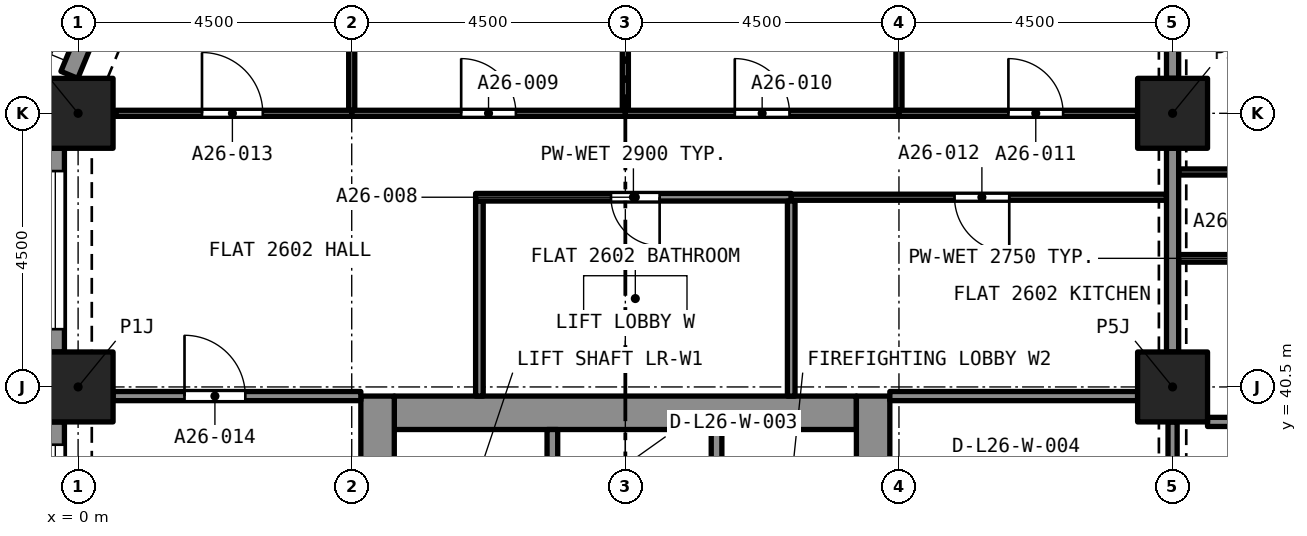
"""IFC4 building model, lengths in metres.
Left out: names, types, materials, properties, quantities, classifications, styles, units other than length and angle.
Written with IfcOpenShell. Run it as: python <this file> out.ifc"""

import sys

from ifc_helpers import new_model, si_unit, direction, frame, frame_2d, origin, origin_2d, place, context, subcontext, project, spatial, rectangle, extrude, element, fill, save


model = new_model("IFC4")
c1 = context("Model", 3, precision=1e-05, world=origin(), true_north=direction((0.0, 1.0)))
c2 = subcontext(c1, "Body", "Model", "MODEL_VIEW")
j1 = project(units=[si_unit("LENGTHUNIT", "METRE"), si_unit("PLANEANGLEUNIT", "RADIAN")], contexts=[c1])
p1 = place(None, origin())
s1 = spatial("IfcSite", under=j1, at=p1, CompositionType="ELEMENT")
p2 = place(p1, origin())
s2 = spatial("IfcBuilding", under=s1, at=p2, CompositionType="ELEMENT")
p3 = place(p2, frame((0.0, 0.0, 96.0)))
s3 = spatial("IfcBuildingStorey", under=s2, at=p3, CompositionType="ELEMENT", Elevation=96.0)
for number, where, z_axis, x_axis in (
    (1, (0.0, 40.5, 0.0), (0.0, 0.0, 1.0), (1.0, 0.0, 0.0)),
    (2, (18.0, 40.5, 0.0), (0.0, 0.0, 1.0), (1.0, 0.0, 0.0)),
    (3, (0.0, 45.0, 0.0), (0.0, 0.0, 1.0), (1.0, 0.0, 0.0)),
    (4, (18.0, 45.0, 0.0), (0.0, 0.0, 1.0), (1.0, 0.0, 0.0)),
):
    element("IfcColumn", number, at=place(p3, frame(where, z_axis=z_axis, x_axis=x_axis)), inside=s3, PredefinedType="COLUMN", context=c2, shape_type="SweptSolid", body=[
        extrude(rectangle(XDim=1.15, YDim=1.15, at=origin_2d()), origin(), (0.0, 0.0, 1.0), 3.2),
    ])
p4 = place(p3, frame((5.2, 40.075, 0.0), z_axis=(0.0, 0.0, 1.0), x_axis=(1.0, 0.0, 0.0)))
e5 = element("IfcWall", 5, at=p4, inside=s3, PredefinedType="SOLIDWALL", context=c2, shape_type="SweptSolid", body=[
    extrude(rectangle(XDim=7.6, YDim=0.55, at=frame_2d((3.8, 0.0))), origin(), (0.0, 0.0, 1.0), 3.2),
])
p5 = place(p3, frame((4.925, 27.15, 0.0), z_axis=(0.0, 0.0, 1.0), x_axis=(0.0, 1.0, 0.0)))
e6 = element("IfcWall", 6, at=p5, inside=s3, PredefinedType="SOLIDWALL", context=c2, shape_type="SweptSolid", body=[
    extrude(rectangle(XDim=13.2, YDim=0.55, at=frame_2d((6.6, 0.0))), origin(), (0.0, 0.0, 1.0), 3.2),
])
p6 = place(p5, frame((8.8, 0.0, 0.0)))
e7 = element("IfcOpeningElement", 7, at=p6, cuts=e6, PredefinedType="OPENING", context=c2, shape_type="SweptSolid", body=[
    extrude(rectangle(XDim=1.2, YDim=2.1, at=frame_2d((0.6, 1.05))), frame((0.0, 0.285, 0.0), z_axis=(0.0, -1.0, 0.0), x_axis=(1.0, 0.0, 0.0)), (0.0, 0.0, 1.0), 0.57),
])
p7 = place(p3, frame((13.075, 27.15, 0.0), z_axis=(0.0, 0.0, 1.0), x_axis=(0.0, 1.0, 0.0)))
e8 = element("IfcWall", 8, at=p7, inside=s3, PredefinedType="SOLIDWALL", context=c2, shape_type="SweptSolid", body=[
    extrude(rectangle(XDim=13.2, YDim=0.55, at=frame_2d((6.6, 0.0))), origin(), (0.0, 0.0, 1.0), 3.2),
])
p8 = place(p7, frame((10.95, 0.0, 0.0)))
e9 = element("IfcOpeningElement", 9, at=p8, cuts=e8, PredefinedType="OPENING", context=c2, shape_type="SweptSolid", body=[
    extrude(rectangle(XDim=1.1, YDim=2.1, at=frame_2d((0.55, 1.05))), frame((0.0, 0.285, 0.0), z_axis=(0.0, -1.0, 0.0), x_axis=(1.0, 0.0, 0.0)), (0.0, 0.0, 1.0), 0.57),
])
p9 = place(p7, frame((8.8, 0.0, 0.0)))
e10 = element("IfcOpeningElement", 10, at=p9, cuts=e8, PredefinedType="OPENING", context=c2, shape_type="SweptSolid", body=[
    extrude(rectangle(XDim=1.2, YDim=2.1, at=frame_2d((0.6, 1.05))), frame((0.0, 0.285, 0.0), z_axis=(0.0, -1.0, 0.0), x_axis=(1.0, 0.0, 0.0)), (0.0, 0.0, 1.0), 0.57),
])
p10 = place(p3, frame((-0.144, 45.632, 0.0), z_axis=(0.0, 0.0, 1.0), x_axis=(0.382723818695, 0.923862802911, 0.0)))
e11 = element("IfcWall", 11, at=p10, inside=s3, PredefinedType="SOLIDWALL", context=c2, shape_type="SweptSolid", body=[
    extrude(rectangle(XDim=2.164, YDim=0.3, at=frame_2d((1.082, 0.0))), origin(), (0.0, 0.0, 1.0), 3.2),
])
p11 = place(p10, frame((0.493, 0.0, 0.45)))
e12 = element("IfcOpeningElement", 12, at=p11, cuts=e11, PredefinedType="OPENING", context=c2, shape_type="SweptSolid", body=[
    extrude(rectangle(XDim=1.4, YDim=1.95, at=frame_2d((0.7, 0.975))), frame((0.0, 0.16, 0.0), z_axis=(0.0, -1.0, 0.0), x_axis=(1.0, 0.0, 0.0)), (0.0, 0.0, 1.0), 0.32),
])
p12 = place(p3, frame((-0.375, 41.075, 0.0), z_axis=(0.0, 0.0, 1.0), x_axis=(0.0, 1.0, 0.0)))
e13 = element("IfcWall", 13, at=p12, inside=s3, PredefinedType="SOLIDWALL", context=c2, shape_type="SweptSolid", body=[
    extrude(rectangle(XDim=3.35, YDim=0.3, at=frame_2d((1.675, 0.0))), origin(), (0.0, 0.0, 1.0), 3.2),
])
p13 = place(p12, frame((0.375, 0.0, 0.45)))
e14 = element("IfcOpeningElement", 14, at=p13, cuts=e13, PredefinedType="OPENING", context=c2, shape_type="SweptSolid", body=[
    extrude(rectangle(XDim=2.6, YDim=1.95, at=frame_2d((1.3, 0.975))), frame((0.0, 0.16, 0.0), z_axis=(0.0, -1.0, 0.0), x_axis=(1.0, 0.0, 0.0)), (0.0, 0.0, 1.0), 0.32),
])
p14 = place(p3, frame((-0.375, 36.575, 0.0), z_axis=(0.0, 0.0, 1.0), x_axis=(0.0, 1.0, 0.0)))
e15 = element("IfcWall", 15, at=p14, inside=s3, PredefinedType="SOLIDWALL", context=c2, shape_type="SweptSolid", body=[
    extrude(rectangle(XDim=3.35, YDim=0.3, at=frame_2d((1.675, 0.0))), origin(), (0.0, 0.0, 1.0), 3.2),
])
p15 = place(p14, frame((0.375, 0.0, 0.45)))
e16 = element("IfcOpeningElement", 16, at=p15, cuts=e15, PredefinedType="OPENING", context=c2, shape_type="SweptSolid", body=[
    extrude(rectangle(XDim=2.6, YDim=1.95, at=frame_2d((1.3, 0.975))), frame((0.0, 0.16, 0.0), z_axis=(0.0, -1.0, 0.0), x_axis=(1.0, 0.0, 0.0)), (0.0, 0.0, 1.0), 0.32),
])
p16 = place(p3, frame((6.6, 40.35, 0.0), z_axis=(0.0, 0.0, 1.0), x_axis=(0.0, 1.0, 0.0)))
e17 = element("IfcWall", 17, at=p16, inside=s3, PredefinedType="PARTITIONING", context=c2, shape_type="SweptSolid", body=[
    extrude(rectangle(XDim=3.208, YDim=0.125, at=frame_2d((1.604, 0.0))), origin(), (0.0, 0.0, 1.0), 2.9),
])
p17 = place(p3, frame((11.728, 43.62, 0.0), z_axis=(0.0, 0.0, 1.0), x_axis=(-1.0, 0.0, 0.0)))
e18 = element("IfcWall", 18, at=p17, inside=s3, PredefinedType="PARTITIONING", context=c2, shape_type="SweptSolid", body=[
    extrude(rectangle(XDim=5.19, YDim=0.125, at=frame_2d((2.595, 0.0))), origin(), (0.0, 0.0, 1.0), 2.9),
])
p18 = place(p17, frame((2.164, 0.0, 0.0)))
e19 = element("IfcOpeningElement", 19, at=p18, cuts=e18, PredefinedType="OPENING", context=c2, shape_type="SweptSolid", body=[
    extrude(rectangle(XDim=0.8, YDim=2.1, at=frame_2d((0.4, 1.05))), frame((0.0, 0.073, 0.0), z_axis=(0.0, -1.0, 0.0), x_axis=(1.0, 0.0, 0.0)), (0.0, 0.0, 1.0), 0.145),
])
p19 = place(p3, frame((11.728, 40.35, 0.0), z_axis=(0.0, 0.0, 1.0), x_axis=(0.0, 1.0, 0.0)))
e20 = element("IfcWall", 20, at=p19, inside=s3, PredefinedType="PARTITIONING", context=c2, shape_type="SweptSolid", body=[
    extrude(rectangle(XDim=3.208, YDim=0.125, at=frame_2d((1.604, 0.0))), origin(), (0.0, 0.0, 1.0), 2.9),
])
p20 = place(p3, frame((9.0, 45.05, 0.0), z_axis=(0.0, 0.0, 1.0), x_axis=(0.0, 1.0, 0.0)))
e21 = element("IfcWall", 21, at=p20, inside=s3, PredefinedType="PARTITIONING", context=c2, shape_type="SweptSolid", body=[
    extrude(rectangle(XDim=3.875, YDim=0.1, at=frame_2d((1.938, 0.0))), origin(), (0.0, 0.0, 1.0), 2.9),
])
p21 = place(p3, frame((4.5, 45.0, 0.0), z_axis=(0.0, 0.0, 1.0), x_axis=(1.0, 0.0, 0.0)))
e22 = element("IfcWall", 22, at=p21, inside=s3, PredefinedType="PARTITIONING", context=c2, shape_type="SweptSolid", body=[
    extrude(rectangle(XDim=4.5, YDim=0.1, at=frame_2d((2.25, 0.0))), origin(), (0.0, 0.0, 1.0), 2.9),
])
p22 = place(p21, frame((1.8, 0.0, 0.0)))
e23 = element("IfcOpeningElement", 23, at=p22, cuts=e22, PredefinedType="OPENING", context=c2, shape_type="SweptSolid", body=[
    extrude(rectangle(XDim=0.9, YDim=2.1, at=frame_2d((0.45, 1.05))), frame((0.0, 0.06, 0.0), z_axis=(0.0, -1.0, 0.0), x_axis=(1.0, 0.0, 0.0)), (0.0, 0.0, 1.0), 0.12),
])
p23 = place(p3, frame((4.5, 45.05, 0.0), z_axis=(0.0, 0.0, 1.0), x_axis=(0.0, 1.0, 0.0)))
e24 = element("IfcWall", 24, at=p23, inside=s3, PredefinedType="PARTITIONING", context=c2, shape_type="SweptSolid", body=[
    extrude(rectangle(XDim=3.828, YDim=0.1, at=frame_2d((1.914, 0.0))), origin(), (0.0, 0.0, 1.0), 2.9),
])
p24 = place(p3, frame((13.5, 45.05, 0.0), z_axis=(0.0, 0.0, 1.0), x_axis=(0.0, 1.0, 0.0)))
e25 = element("IfcWall", 25, at=p24, inside=s3, PredefinedType="PARTITIONING", context=c2, shape_type="SweptSolid", body=[
    extrude(rectangle(XDim=3.875, YDim=0.1, at=frame_2d((1.938, 0.0))), origin(), (0.0, 0.0, 1.0), 2.9),
])
p25 = place(p3, frame((9.0, 45.0, 0.0), z_axis=(0.0, 0.0, 1.0), x_axis=(1.0, 0.0, 0.0)))
e26 = element("IfcWall", 26, at=p25, inside=s3, PredefinedType="PARTITIONING", context=c2, shape_type="SweptSolid", body=[
    extrude(rectangle(XDim=4.5, YDim=0.1, at=frame_2d((2.25, 0.0))), origin(), (0.0, 0.0, 1.0), 2.9),
])
p26 = place(p25, frame((1.8, 0.0, 0.0)))
e27 = element("IfcOpeningElement", 27, at=p26, cuts=e26, PredefinedType="OPENING", context=c2, shape_type="SweptSolid", body=[
    extrude(rectangle(XDim=0.9, YDim=2.1, at=frame_2d((0.45, 1.05))), frame((0.0, 0.06, 0.0), z_axis=(0.0, -1.0, 0.0), x_axis=(1.0, 0.0, 0.0)), (0.0, 0.0, 1.0), 0.12),
])
p27 = place(p3, frame((13.5, 45.0, 0.0), z_axis=(0.0, 0.0, 1.0), x_axis=(1.0, 0.0, 0.0)))
e28 = element("IfcWall", 28, at=p27, inside=s3, PredefinedType="PARTITIONING", context=c2, shape_type="SweptSolid", body=[
    extrude(rectangle(XDim=3.925, YDim=0.1, at=frame_2d((1.962, 0.0))), origin(), (0.0, 0.0, 1.0), 2.9),
])
p28 = place(p27, frame((1.8, 0.0, 0.0)))
e29 = element("IfcOpeningElement", 29, at=p28, cuts=e28, PredefinedType="OPENING", context=c2, shape_type="SweptSolid", body=[
    extrude(rectangle(XDim=0.9, YDim=2.1, at=frame_2d((0.45, 1.05))), frame((0.0, 0.06, 0.0), z_axis=(0.0, -1.0, 0.0), x_axis=(1.0, 0.0, 0.0)), (0.0, 0.0, 1.0), 0.12),
])
p29 = place(p3, frame((18.0, 45.575, 0.0), z_axis=(0.0, 0.0, 1.0), x_axis=(0.0, 1.0, 0.0)))
e30 = element("IfcWall", 30, at=p29, inside=s3, PredefinedType="PARTITIONING", context=c2, shape_type="SweptSolid", body=[
    extrude(rectangle(XDim=3.35, YDim=0.2, at=frame_2d((1.675, 0.0))), origin(), (0.0, 0.0, 1.0), 2.38),
])
p30 = place(p3, frame((17.9, 43.62, 0.0), z_axis=(0.0, 0.0, 1.0), x_axis=(-1.0, 0.0, 0.0)))
e31 = element("IfcWall", 31, at=p30, inside=s3, PredefinedType="PARTITIONING", context=c2, shape_type="SweptSolid", body=[
    extrude(rectangle(XDim=6.172, YDim=0.1, at=frame_2d((3.086, 0.0))), origin(), (0.0, 0.0, 1.0), 2.9),
])
p31 = place(p30, frame((2.586, 0.0, 0.0)))
e32 = element("IfcOpeningElement", 32, at=p31, cuts=e31, PredefinedType="OPENING", context=c2, shape_type="SweptSolid", body=[
    extrude(rectangle(XDim=0.9, YDim=2.1, at=frame_2d((0.45, 1.05))), frame((0.0, 0.06, 0.0), z_axis=(0.0, -1.0, 0.0), x_axis=(1.0, 0.0, 0.0)), (0.0, 0.0, 1.0), 0.12),
])
p32 = place(p3, frame((0.622, 45.0, 0.0), z_axis=(0.0, 0.0, 1.0), x_axis=(1.0, 0.0, 0.0)))
e33 = element("IfcWall", 33, at=p32, inside=s3, PredefinedType="PARTITIONING", context=c2, shape_type="SweptSolid", body=[
    extrude(rectangle(XDim=3.878, YDim=0.1, at=frame_2d((1.939, 0.0))), origin(), (0.0, 0.0, 1.0), 2.9),
])
p33 = place(p32, frame((1.415, 0.0, 0.0)))
e34 = element("IfcOpeningElement", 34, at=p33, cuts=e33, PredefinedType="OPENING", context=c2, shape_type="SweptSolid", body=[
    extrude(rectangle(XDim=1.0, YDim=2.1, at=frame_2d((0.5, 1.05))), frame((0.0, 0.06, 0.0), z_axis=(0.0, -1.0, 0.0), x_axis=(1.0, 0.0, 0.0)), (0.0, 0.0, 1.0), 0.12),
])
p34 = place(p3, frame((0.575, 40.35, 0.0), z_axis=(0.0, 0.0, 1.0), x_axis=(1.0, 0.0, 0.0)))
e35 = element("IfcWall", 35, at=p34, inside=s3, PredefinedType="PARTITIONING", context=c2, shape_type="SweptSolid", body=[
    extrude(rectangle(XDim=4.075, YDim=0.15, at=frame_2d((2.038, 0.0))), origin(), (0.0, 0.0, 1.0), 2.9),
])
p35 = place(p34, frame((1.175, 0.0, 0.0)))
e36 = element("IfcOpeningElement", 36, at=p35, cuts=e35, PredefinedType="OPENING", context=c2, shape_type="SweptSolid", body=[
    extrude(rectangle(XDim=1.0, YDim=2.1, at=frame_2d((0.5, 1.05))), frame((0.0, 0.085, 0.0), z_axis=(0.0, -1.0, 0.0), x_axis=(1.0, 0.0, 0.0)), (0.0, 0.0, 1.0), 0.17),
])
p36 = place(p3, frame((18.0, 41.075, 0.0), z_axis=(0.0, 0.0, 1.0), x_axis=(0.0, 1.0, 0.0)))
e37 = element("IfcWall", 37, at=p36, inside=s3, PredefinedType="PARTITIONING", context=c2, shape_type="SweptSolid", body=[
    extrude(rectangle(XDim=3.35, YDim=0.2, at=frame_2d((1.675, 0.0))), origin(), (0.0, 0.0, 1.0), 2.38),
])
p37 = place(p3, frame((13.35, 40.35, 0.0), z_axis=(0.0, 0.0, 1.0), x_axis=(1.0, 0.0, 0.0)))
e38 = element("IfcWall", 38, at=p37, inside=s3, PredefinedType="PARTITIONING", context=c2, shape_type="SweptSolid", body=[
    extrude(rectangle(XDim=4.075, YDim=0.15, at=frame_2d((2.038, 0.0))), origin(), (0.0, 0.0, 1.0), 2.9),
])
p38 = place(p3, frame((20.762, 42.615, 0.0), z_axis=(0.0, 0.0, 1.0), x_axis=(-1.0, 0.0, 0.0)))
e39 = element("IfcWall", 39, at=p38, inside=s3, PredefinedType="PARTITIONING", context=c2, shape_type="SweptSolid", body=[
    extrude(rectangle(XDim=2.662, YDim=0.125, at=frame_2d((1.331, 0.0))), origin(), (0.0, 0.0, 1.0), 2.75),
])
p39 = place(p38, frame((1.012, 0.0, 0.0)))
e40 = element("IfcOpeningElement", 40, at=p39, cuts=e39, PredefinedType="OPENING", context=c2, shape_type="SweptSolid", body=[
    extrude(rectangle(XDim=0.8, YDim=2.1, at=frame_2d((0.4, 1.05))), frame((0.0, 0.073, 0.0), z_axis=(0.0, -1.0, 0.0), x_axis=(1.0, 0.0, 0.0)), (0.0, 0.0, 1.0), 0.145),
])
p40 = place(p3, frame((18.575, 39.925, 0.0), z_axis=(0.0, 0.0, 1.0), x_axis=(1.0, 0.0, 0.0)))
e41 = element("IfcWall", 41, at=p40, inside=s3, PredefinedType="PARTITIONING", context=c2, shape_type="SweptSolid", body=[
    extrude(rectangle(XDim=2.125, YDim=0.15, at=frame_2d((1.062, 0.0))), origin(), (0.0, 0.0, 1.0), 2.75),
])
p41 = place(p3, frame((18.1, 44.035, 0.0), z_axis=(0.0, 0.0, 1.0), x_axis=(1.0, 0.0, 0.0)))
e42 = element("IfcWall", 42, at=p41, inside=s3, PredefinedType="PARTITIONING", context=c2, shape_type="SweptSolid", body=[
    extrude(rectangle(XDim=4.4, YDim=0.1, at=frame_2d((2.2, 0.0))), origin(), (0.0, 0.0, 1.0), 2.75),
])
p42 = place(p41, frame((1.65, 0.0, 0.0)))
e43 = element("IfcOpeningElement", 43, at=p42, cuts=e42, PredefinedType="OPENING", context=c2, shape_type="SweptSolid", body=[
    extrude(rectangle(XDim=1.0, YDim=2.1, at=frame_2d((0.5, 1.05))), frame((0.0, 0.06, 0.0), z_axis=(0.0, -1.0, 0.0), x_axis=(1.0, 0.0, 0.0)), (0.0, 0.0, 1.0), 0.12),
])
p43 = place(p3, frame((18.0, 39.925, 0.0), z_axis=(0.0, 0.0, 1.0), x_axis=(0.0, -1.0, 0.0)))
e44 = element("IfcWall", 44, at=p43, inside=s3, PredefinedType="PARTITIONING", context=c2, shape_type="SweptSolid", body=[
    extrude(rectangle(XDim=3.35, YDim=0.15, at=frame_2d((1.675, 0.0))), origin(), (0.0, 0.0, 1.0), 2.38),
])
p44 = place(p43, frame((1.075, 0.0, 0.0)))
e45 = element("IfcOpeningElement", 45, at=p44, cuts=e44, PredefinedType="OPENING", context=c2, shape_type="SweptSolid", body=[
    extrude(rectangle(XDim=1.2, YDim=2.1, at=frame_2d((0.6, 1.05))), frame((0.0, 0.085, 0.0), z_axis=(0.0, -1.0, 0.0), x_axis=(1.0, 0.0, 0.0)), (0.0, 0.0, 1.0), 0.17),
])
p45 = place(p3, frame((7.8, 37.5, 0.0), z_axis=(0.0, 0.0, 1.0), x_axis=(0.0, 1.0, 0.0)))
e46 = element("IfcWall", 46, at=p45, inside=s3, PredefinedType="SOLIDWALL", context=c2, shape_type="SweptSolid", body=[
    extrude(rectangle(XDim=2.3, YDim=0.175, at=frame_2d((1.15, 0.0))), origin(), (0.0, 0.0, 1.0), 2.9),
])
p46 = place(p3, frame((10.5, 37.5, 0.0), z_axis=(0.0, 0.0, 1.0), x_axis=(0.0, 1.0, 0.0)))
e47 = element("IfcWall", 47, at=p46, inside=s3, PredefinedType="SOLIDWALL", context=c2, shape_type="SweptSolid", body=[
    extrude(rectangle(XDim=2.3, YDim=0.175, at=frame_2d((1.15, 0.0))), origin(), (0.0, 0.0, 1.0), 2.9),
])
p47 = place(p46, frame((0.65, 0.0, 0.0)))
e48 = element("IfcOpeningElement", 48, at=p47, cuts=e47, PredefinedType="OPENING", context=c2, shape_type="SweptSolid", body=[
    extrude(rectangle(XDim=1.0, YDim=2.1, at=frame_2d((0.5, 1.05))), frame((0.0, 0.097, 0.0), z_axis=(0.0, -1.0, 0.0), x_axis=(1.0, 0.0, 0.0)), (0.0, 0.0, 1.0), 0.195),
])
p48 = place(p13, origin())
e49 = element("IfcWindow", 49, at=p48, inside=s3, PartitioningType="SINGLE_PANEL", PredefinedType="WINDOW", context=c2, shape_type="SweptSolid", body=[
    extrude(rectangle(XDim=2.6, YDim=1.95, at=frame_2d((1.3, 0.975))), frame((0.0, 0.03, 0.0), z_axis=(0.0, -1.0, 0.0), x_axis=(1.0, 0.0, 0.0)), (0.0, 0.0, 1.0), 0.06),
])
fill(e14, e49)
p49 = place(p15, origin())
e50 = element("IfcWindow", 50, at=p49, inside=s3, PartitioningType="SINGLE_PANEL", PredefinedType="WINDOW", context=c2, shape_type="SweptSolid", body=[
    extrude(rectangle(XDim=2.6, YDim=1.95, at=frame_2d((1.3, 0.975))), frame((0.0, 0.03, 0.0), z_axis=(0.0, -1.0, 0.0), x_axis=(1.0, 0.0, 0.0)), (0.0, 0.0, 1.0), 0.06),
])
fill(e16, e50)
p50 = place(p18, origin())
e51 = element("IfcDoor", 51, at=p50, inside=s3, OperationType="SINGLE_SWING_LEFT", PredefinedType="DOOR", context=c2, shape_type="SweptSolid", body=[
    extrude(rectangle(XDim=0.8, YDim=2.1, at=frame_2d((0.4, 1.05))), frame((0.0, 0.025, 0.0), z_axis=(0.0, -1.0, 0.0), x_axis=(1.0, 0.0, 0.0)), (0.0, 0.0, 1.0), 0.05),
])
fill(e19, e51)
p51 = place(p22, origin())
e52 = element("IfcDoor", 52, at=p51, inside=s3, OperationType="SINGLE_SWING_RIGHT", PredefinedType="DOOR", context=c2, shape_type="SweptSolid", body=[
    extrude(rectangle(XDim=0.9, YDim=2.1, at=frame_2d((0.45, 1.05))), frame((0.0, 0.025, 0.0), z_axis=(0.0, -1.0, 0.0), x_axis=(1.0, 0.0, 0.0)), (0.0, 0.0, 1.0), 0.05),
])
fill(e23, e52)
p52 = place(p26, origin())
e53 = element("IfcDoor", 53, at=p52, inside=s3, OperationType="SINGLE_SWING_LEFT", PredefinedType="DOOR", context=c2, shape_type="SweptSolid", body=[
    extrude(rectangle(XDim=0.9, YDim=2.1, at=frame_2d((0.45, 1.05))), frame((0.0, 0.025, 0.0), z_axis=(0.0, -1.0, 0.0), x_axis=(1.0, 0.0, 0.0)), (0.0, 0.0, 1.0), 0.05),
])
fill(e27, e53)
p53 = place(p28, origin())
e54 = element("IfcDoor", 54, at=p53, inside=s3, OperationType="SINGLE_SWING_RIGHT", PredefinedType="DOOR", context=c2, shape_type="SweptSolid", body=[
    extrude(rectangle(XDim=0.9, YDim=2.1, at=frame_2d((0.45, 1.05))), frame((0.0, 0.025, 0.0), z_axis=(0.0, -1.0, 0.0), x_axis=(1.0, 0.0, 0.0)), (0.0, 0.0, 1.0), 0.05),
])
fill(e29, e54)
p54 = place(p31, origin())
e55 = element("IfcDoor", 55, at=p54, inside=s3, OperationType="SINGLE_SWING_LEFT", PredefinedType="DOOR", context=c2, shape_type="SweptSolid", body=[
    extrude(rectangle(XDim=0.9, YDim=2.1, at=frame_2d((0.45, 1.05))), frame((0.0, 0.025, 0.0), z_axis=(0.0, -1.0, 0.0), x_axis=(1.0, 0.0, 0.0)), (0.0, 0.0, 1.0), 0.05),
])
fill(e32, e55)
p55 = place(p33, origin())
e56 = element("IfcDoor", 56, at=p55, inside=s3, OperationType="SINGLE_SWING_LEFT", PredefinedType="DOOR", context=c2, shape_type="SweptSolid", body=[
    extrude(rectangle(XDim=1.0, YDim=2.1, at=frame_2d((0.5, 1.05))), frame((0.0, 0.025, 0.0), z_axis=(0.0, -1.0, 0.0), x_axis=(1.0, 0.0, 0.0)), (0.0, 0.0, 1.0), 0.05),
])
fill(e34, e56)
p56 = place(p35, origin())
e57 = element("IfcDoor", 57, at=p56, inside=s3, OperationType="SINGLE_SWING_LEFT", PredefinedType="DOOR", context=c2, shape_type="SweptSolid", body=[
    extrude(rectangle(XDim=1.0, YDim=2.1, at=frame_2d((0.5, 1.05))), frame((0.0, 0.025, 0.0), z_axis=(0.0, -1.0, 0.0), x_axis=(1.0, 0.0, 0.0)), (0.0, 0.0, 1.0), 0.05),
])
fill(e36, e57)
save(model, sys.argv[1])
